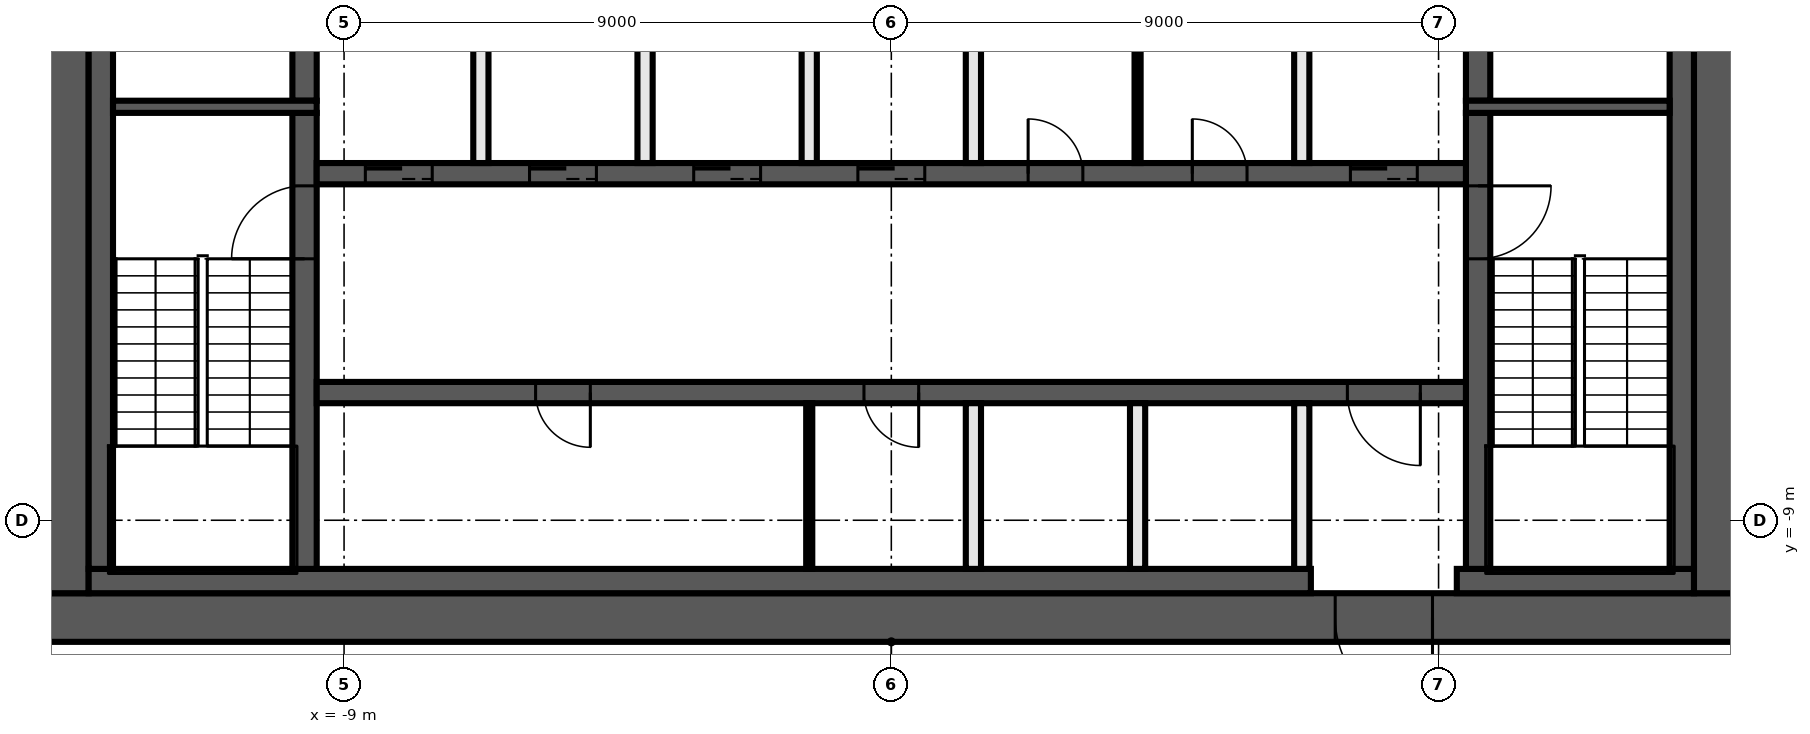
"""IFC4 building model, lengths in metres.
Left out: names, types, materials, properties, quantities, classifications, styles, units other than length and angle.
Written with IfcOpenShell. Run it as: python <this file> out.ifc"""

import sys

from ifc_helpers import new_model, si_unit, direction, frame, frame_2d, origin, place, context, subcontext, project, spatial, rectangle, extrude, element, fill, save


model = new_model("IFC4")
c1 = context("Model", 3, precision=1e-05, world=origin(), true_north=direction((0.0, 1.0)))
c2 = subcontext(c1, "Body", "Model", "MODEL_VIEW")
j1 = project(units=[si_unit("LENGTHUNIT", "METRE"), si_unit("PLANEANGLEUNIT", "RADIAN")], contexts=[c1])
p1 = place(None, origin())
s1 = spatial("IfcSite", under=j1, at=p1, CompositionType="ELEMENT")
p2 = place(p1, origin())
s2 = spatial("IfcBuilding", under=s1, at=p2, CompositionType="ELEMENT")
p3 = place(p2, frame((0.0, 0.0, 175.4)))
s3 = spatial("IfcBuildingStorey", under=s2, at=p3, CompositionType="ELEMENT", Elevation=175.4)
p4 = place(p3, frame((14.0, -10.6, 0.0), z_axis=(0.0, 0.0, 1.0), x_axis=(-1.0, 0.0, 0.0)))
e1 = element("IfcWall", 1, at=p4, inside=s3, PredefinedType="SHEAR", context=c2, shape_type="SweptSolid", body=[
    extrude(rectangle(XDim=28.0, YDim=0.8, at=frame_2d((14.0, 0.0))), origin(), (0.0, 0.0, 1.0), 3.82),
])
p5 = place(p4, frame((5.1, 0.0, 0.0)))
e2 = element("IfcOpeningElement", 2, at=p5, cuts=e1, PredefinedType="OPENING", context=c2, shape_type="SweptSolid", body=[
    extrude(rectangle(XDim=1.6, YDim=2.1, at=frame_2d((0.8, 1.05))), frame((0.0, 0.41, 0.0), z_axis=(0.0, -1.0, 0.0), x_axis=(1.0, 0.0, 0.0)), (0.0, 0.0, 1.0), 0.82),
])
for number, where, z_axis, x_axis in (
    (3, (13.6, 10.2, 0.0), (0.0, 0.0, 1.0), (0.0, -1.0, 0.0)),
    (4, (-13.6, -10.2, 0.0), (0.0, 0.0, 1.0), (0.0, 1.0, 0.0)),
):
    element("IfcWall", number, at=place(p3, frame(where, z_axis=z_axis, x_axis=x_axis)), inside=s3, PredefinedType="SHEAR", context=c2, shape_type="SweptSolid", body=[
        extrude(rectangle(XDim=20.4, YDim=0.8, at=frame_2d((10.2, 0.0))), origin(), (0.0, 0.0, 1.0), 3.82),
    ])
p6 = place(p3, frame((13.2, -10.0, 0.0), z_axis=(0.0, 0.0, 1.0), x_axis=(-1.0, 0.0, 0.0)))
e5 = element("IfcWall", 5, at=p6, inside=s3, PredefinedType="SHEAR", context=c2, shape_type="SweptSolid", body=[
    extrude(rectangle(XDim=3.9, YDim=0.4, at=frame_2d((1.95, 0.0))), origin(), (0.0, 0.0, 1.0), 3.82),
])
p7 = place(p3, frame((6.9, -10.0, 0.0), z_axis=(0.0, 0.0, 1.0), x_axis=(-1.0, 0.0, 0.0)))
e6 = element("IfcWall", 6, at=p7, inside=s3, PredefinedType="SHEAR", context=c2, shape_type="SweptSolid", body=[
    extrude(rectangle(XDim=20.1, YDim=0.4, at=frame_2d((10.05, 0.0))), origin(), (0.0, 0.0, 1.0), 3.82),
])
for number, where, z_axis, x_axis in (
    (7, (13.0, 9.8, 0.0), (0.0, 0.0, 1.0), (0.0, -1.0, 0.0)),
    (8, (-13.0, -9.8, 0.0), (0.0, 0.0, 1.0), (0.0, 1.0, 0.0)),
):
    element("IfcWall", number, at=place(p3, frame(where, z_axis=z_axis, x_axis=x_axis)), inside=s3, PredefinedType="SHEAR", context=c2, shape_type="SweptSolid", body=[
        extrude(rectangle(XDim=19.6, YDim=0.4, at=frame_2d((9.8, 0.0))), origin(), (0.0, 0.0, 1.0), 3.82),
    ])
p8 = place(p3, frame((9.65, -2.3, 0.0), z_axis=(0.0, 0.0, 1.0), x_axis=(0.0, -1.0, 0.0)))
e9 = element("IfcWall", 9, at=p8, inside=s3, PredefinedType="SHEAR", context=c2, shape_type="SweptSolid", body=[
    extrude(rectangle(XDim=7.5, YDim=0.4, at=frame_2d((3.75, 0.0))), origin(), (0.0, 0.0, 1.0), 3.82),
])
p9 = place(p8, frame((1.2, 0.0, 0.0)))
e10 = element("IfcOpeningElement", 10, at=p9, cuts=e9, PredefinedType="OPENING", context=c2, shape_type="SweptSolid", body=[
    extrude(rectangle(XDim=1.2, YDim=2.1, at=frame_2d((0.6, 1.05))), frame((0.0, 0.21, 0.0), z_axis=(0.0, -1.0, 0.0), x_axis=(1.0, 0.0, 0.0)), (0.0, 0.0, 1.0), 0.42),
])
p10 = place(p3, frame((9.65, 2.1, 0.0), z_axis=(0.0, 0.0, 1.0), x_axis=(0.0, -1.0, 0.0)))
e11 = element("IfcWall", 11, at=p10, inside=s3, PredefinedType="SHEAR", context=c2, shape_type="SweptSolid", body=[
    extrude(rectangle(XDim=4.2, YDim=0.4, at=frame_2d((2.1, 0.0))), origin(), (0.0, 0.0, 1.0), 3.82),
])
p11 = place(p10, frame((0.15, 0.0, 0.0)))
e12 = element("IfcOpeningElement", 12, at=p11, cuts=e11, PredefinedType="OPENING", context=c2, shape_type="SweptSolid", body=[
    extrude(rectangle(XDim=0.9, YDim=2.1, at=frame_2d((0.45, 1.05))), frame((0.0, 0.21, 0.0), z_axis=(0.0, -1.0, 0.0), x_axis=(1.0, 0.0, 0.0)), (0.0, 0.0, 1.0), 0.42),
])
p12 = place(p3, frame((-9.65, -9.8, 0.0), z_axis=(0.0, 0.0, 1.0), x_axis=(0.0, 1.0, 0.0)))
e13 = element("IfcWall", 13, at=p12, inside=s3, PredefinedType="SHEAR", context=c2, shape_type="SweptSolid", body=[
    extrude(rectangle(XDim=7.5, YDim=0.4, at=frame_2d((3.75, 0.0))), origin(), (0.0, 0.0, 1.0), 3.82),
])
p13 = place(p12, frame((5.1, 0.0, 0.0)))
e14 = element("IfcOpeningElement", 14, at=p13, cuts=e13, PredefinedType="OPENING", context=c2, shape_type="SweptSolid", body=[
    extrude(rectangle(XDim=1.2, YDim=2.1, at=frame_2d((0.6, 1.05))), frame((0.0, 0.21, 0.0), z_axis=(0.0, -1.0, 0.0), x_axis=(1.0, 0.0, 0.0)), (0.0, 0.0, 1.0), 0.42),
])
p14 = place(p3, frame((-9.65, -2.1, 0.0), z_axis=(0.0, 0.0, 1.0), x_axis=(0.0, 1.0, 0.0)))
e15 = element("IfcWall", 15, at=p14, inside=s3, PredefinedType="SHEAR", context=c2, shape_type="SweptSolid", body=[
    extrude(rectangle(XDim=4.2, YDim=0.4, at=frame_2d((2.1, 0.0))), origin(), (0.0, 0.0, 1.0), 3.82),
])
for number, where, z_axis, x_axis in (
    (16, (9.45, -2.2, 0.0), (0.0, 0.0, 1.0), (1.0, 0.0, 0.0)),
    (17, (-9.45, -2.2, 0.0), (0.0, 0.0, 1.0), (-1.0, 0.0, 0.0)),
):
    element("IfcWall", number, at=place(p3, frame(where, z_axis=z_axis, x_axis=x_axis)), inside=s3, PredefinedType="SHEAR", context=c2, shape_type="SweptSolid", body=[
        extrude(rectangle(XDim=3.35, YDim=0.2, at=frame_2d((1.675, 0.0))), origin(), (0.0, 0.0, 1.0), 3.82),
    ])
p15 = place(p3, frame((-9.45, -3.3, 0.0), z_axis=(0.0, 0.0, 1.0), x_axis=(1.0, 0.0, 0.0)))
e18 = element("IfcWall", 18, at=p15, inside=s3, PredefinedType="SHEAR", context=c2, shape_type="SweptSolid", body=[
    extrude(rectangle(XDim=18.9, YDim=0.35, at=frame_2d((9.45, 0.0))), origin(), (0.0, 0.0, 1.0), 3.82),
])
p16 = place(p15, frame((0.8, 0.0, 0.0)))
e19 = element("IfcOpeningElement", 19, at=p16, cuts=e18, PredefinedType="OPENING", context=c2, shape_type="SweptSolid", body=[
    extrude(rectangle(XDim=1.1, YDim=2.1, at=frame_2d((0.55, 1.05))), frame((0.0, 0.185, 0.0), z_axis=(0.0, -1.0, 0.0), x_axis=(1.0, 0.0, 0.0)), (0.0, 0.0, 1.0), 0.37),
])
p17 = place(p15, frame((3.5, 0.0, 0.0)))
e20 = element("IfcOpeningElement", 20, at=p17, cuts=e18, PredefinedType="OPENING", context=c2, shape_type="SweptSolid", body=[
    extrude(rectangle(XDim=1.1, YDim=2.1, at=frame_2d((0.55, 1.05))), frame((0.0, 0.185, 0.0), z_axis=(0.0, -1.0, 0.0), x_axis=(1.0, 0.0, 0.0)), (0.0, 0.0, 1.0), 0.37),
])
p18 = place(p15, frame((6.2, 0.0, 0.0)))
e21 = element("IfcOpeningElement", 21, at=p18, cuts=e18, PredefinedType="OPENING", context=c2, shape_type="SweptSolid", body=[
    extrude(rectangle(XDim=1.1, YDim=2.1, at=frame_2d((0.55, 1.05))), frame((0.0, 0.185, 0.0), z_axis=(0.0, -1.0, 0.0), x_axis=(1.0, 0.0, 0.0)), (0.0, 0.0, 1.0), 0.37),
])
p19 = place(p15, frame((8.9, 0.0, 0.0)))
e22 = element("IfcOpeningElement", 22, at=p19, cuts=e18, PredefinedType="OPENING", context=c2, shape_type="SweptSolid", body=[
    extrude(rectangle(XDim=1.1, YDim=2.1, at=frame_2d((0.55, 1.05))), frame((0.0, 0.185, 0.0), z_axis=(0.0, -1.0, 0.0), x_axis=(1.0, 0.0, 0.0)), (0.0, 0.0, 1.0), 0.37),
])
p20 = place(p15, frame((17.0, 0.0, 0.0)))
e23 = element("IfcOpeningElement", 23, at=p20, cuts=e18, PredefinedType="OPENING", context=c2, shape_type="SweptSolid", body=[
    extrude(rectangle(XDim=1.1, YDim=2.1, at=frame_2d((0.55, 1.05))), frame((0.0, 0.185, 0.0), z_axis=(0.0, -1.0, 0.0), x_axis=(1.0, 0.0, 0.0)), (0.0, 0.0, 1.0), 0.37),
])
p21 = place(p15, frame((11.7, 0.0, 0.0)))
e24 = element("IfcOpeningElement", 24, at=p21, cuts=e18, PredefinedType="OPENING", context=c2, shape_type="SweptSolid", body=[
    extrude(rectangle(XDim=0.9, YDim=2.1, at=frame_2d((0.45, 1.05))), frame((0.0, 0.185, 0.0), z_axis=(0.0, -1.0, 0.0), x_axis=(1.0, 0.0, 0.0)), (0.0, 0.0, 1.0), 0.37),
])
p22 = place(p15, frame((14.4, 0.0, 0.0)))
e25 = element("IfcOpeningElement", 25, at=p22, cuts=e18, PredefinedType="OPENING", context=c2, shape_type="SweptSolid", body=[
    extrude(rectangle(XDim=0.9, YDim=2.1, at=frame_2d((0.45, 1.05))), frame((0.0, 0.185, 0.0), z_axis=(0.0, -1.0, 0.0), x_axis=(1.0, 0.0, 0.0)), (0.0, 0.0, 1.0), 0.37),
])
p23 = place(p3, frame((9.45, -6.9, 0.0), z_axis=(0.0, 0.0, 1.0), x_axis=(-1.0, 0.0, 0.0)))
e26 = element("IfcWall", 26, at=p23, inside=s3, PredefinedType="SHEAR", context=c2, shape_type="SweptSolid", body=[
    extrude(rectangle(XDim=18.9, YDim=0.35, at=frame_2d((9.45, 0.0))), origin(), (0.0, 0.0, 1.0), 3.82),
])
p24 = place(p23, frame((0.75, 0.0, 0.0)))
e27 = element("IfcOpeningElement", 27, at=p24, cuts=e26, PredefinedType="OPENING", context=c2, shape_type="SweptSolid", body=[
    extrude(rectangle(XDim=1.2, YDim=2.1, at=frame_2d((0.6, 1.05))), frame((0.0, 0.185, 0.0), z_axis=(0.0, -1.0, 0.0), x_axis=(1.0, 0.0, 0.0)), (0.0, 0.0, 1.0), 0.37),
])
p25 = place(p23, frame((14.4, 0.0, 0.0)))
e28 = element("IfcOpeningElement", 28, at=p25, cuts=e26, PredefinedType="OPENING", context=c2, shape_type="SweptSolid", body=[
    extrude(rectangle(XDim=0.9, YDim=2.1, at=frame_2d((0.45, 1.05))), frame((0.0, 0.185, 0.0), z_axis=(0.0, -1.0, 0.0), x_axis=(1.0, 0.0, 0.0)), (0.0, 0.0, 1.0), 0.37),
])
p26 = place(p23, frame((9.0, 0.0, 0.0)))
e29 = element("IfcOpeningElement", 29, at=p26, cuts=e26, PredefinedType="OPENING", context=c2, shape_type="SweptSolid", body=[
    extrude(rectangle(XDim=0.9, YDim=2.1, at=frame_2d((0.45, 1.05))), frame((0.0, 0.185, 0.0), z_axis=(0.0, -1.0, 0.0), x_axis=(1.0, 0.0, 0.0)), (0.0, 0.0, 1.0), 0.37),
])
for number, where, z_axis, x_axis in (
    (30, (6.75, -9.8, 0.0), (0.0, 0.0, 1.0), (0.0, 1.0, 0.0)),
    (31, (6.75, -3.125, 0.0), (0.0, 0.0, 1.0), (0.0, 1.0, 0.0)),
):
    element("IfcWall", number, at=place(p3, frame(where, z_axis=z_axis, x_axis=x_axis)), inside=s3, PredefinedType="SOLIDWALL", context=c2, shape_type="SweptSolid", body=[
        extrude(rectangle(XDim=2.725, YDim=0.25, at=frame_2d((1.363, 0.0))), origin(), (0.0, 0.0, 1.0), 3.82),
    ])
p27 = place(p3, frame((4.05, -3.125, 0.0), z_axis=(0.0, 0.0, 1.0), x_axis=(0.0, 1.0, 0.0)))
e32 = element("IfcWall", 32, at=p27, inside=s3, PredefinedType="PARTITIONING", context=c2, shape_type="SweptSolid", body=[
    extrude(rectangle(XDim=2.725, YDim=0.1, at=frame_2d((1.363, 0.0))), origin(), (0.0, 0.0, 1.0), 3.82),
])
for number, where, z_axis, x_axis in (
    (33, (4.05, -9.8, 0.0), (0.0, 0.0, 1.0), (0.0, 1.0, 0.0)),
    (34, (1.35, -9.8, 0.0), (0.0, 0.0, 1.0), (0.0, 1.0, 0.0)),
    (35, (1.35, -3.125, 0.0), (0.0, 0.0, 1.0), (0.0, 1.0, 0.0)),
):
    element("IfcWall", number, at=place(p3, frame(where, z_axis=z_axis, x_axis=x_axis)), inside=s3, PredefinedType="SOLIDWALL", context=c2, shape_type="SweptSolid", body=[
        extrude(rectangle(XDim=2.725, YDim=0.25, at=frame_2d((1.363, 0.0))), origin(), (0.0, 0.0, 1.0), 3.82),
    ])
p28 = place(p3, frame((-1.35, -9.8, 0.0), z_axis=(0.0, 0.0, 1.0), x_axis=(0.0, 1.0, 0.0)))
e36 = element("IfcWall", 36, at=p28, inside=s3, PredefinedType="PARTITIONING", context=c2, shape_type="SweptSolid", body=[
    extrude(rectangle(XDim=2.725, YDim=0.1, at=frame_2d((1.363, 0.0))), origin(), (0.0, 0.0, 1.0), 3.82),
])
for number, where, z_axis, x_axis in (
    (37, (-1.35, -3.125, 0.0), (0.0, 0.0, 1.0), (0.0, 1.0, 0.0)),
    (38, (-4.05, -3.125, 0.0), (0.0, 0.0, 1.0), (0.0, 1.0, 0.0)),
    (39, (-6.75, -3.125, 0.0), (0.0, 0.0, 1.0), (0.0, 1.0, 0.0)),
):
    element("IfcWall", number, at=place(p3, frame(where, z_axis=z_axis, x_axis=x_axis)), inside=s3, PredefinedType="SOLIDWALL", context=c2, shape_type="SweptSolid", body=[
        extrude(rectangle(XDim=2.725, YDim=0.25, at=frame_2d((1.363, 0.0))), origin(), (0.0, 0.0, 1.0), 3.82),
    ])
p29 = place(p16, origin())
e40 = element("IfcDoor", 40, at=p29, inside=s3, OperationType="DOUBLE_DOOR_SLIDING", PredefinedType="DOOR", context=c2, shape_type="SweptSolid", body=[
    extrude(rectangle(XDim=1.1, YDim=2.1, at=frame_2d((0.55, 1.05))), frame((0.0, 0.025, 0.0), z_axis=(0.0, -1.0, 0.0), x_axis=(1.0, 0.0, 0.0)), (0.0, 0.0, 1.0), 0.05),
])
fill(e19, e40)
p30 = place(p17, origin())
e41 = element("IfcDoor", 41, at=p30, inside=s3, OperationType="DOUBLE_DOOR_SLIDING", PredefinedType="DOOR", context=c2, shape_type="SweptSolid", body=[
    extrude(rectangle(XDim=1.1, YDim=2.1, at=frame_2d((0.55, 1.05))), frame((0.0, 0.025, 0.0), z_axis=(0.0, -1.0, 0.0), x_axis=(1.0, 0.0, 0.0)), (0.0, 0.0, 1.0), 0.05),
])
fill(e20, e41)
p31 = place(p18, origin())
e42 = element("IfcDoor", 42, at=p31, inside=s3, OperationType="DOUBLE_DOOR_SLIDING", PredefinedType="DOOR", context=c2, shape_type="SweptSolid", body=[
    extrude(rectangle(XDim=1.1, YDim=2.1, at=frame_2d((0.55, 1.05))), frame((0.0, 0.025, 0.0), z_axis=(0.0, -1.0, 0.0), x_axis=(1.0, 0.0, 0.0)), (0.0, 0.0, 1.0), 0.05),
])
fill(e21, e42)
p32 = place(p19, origin())
e43 = element("IfcDoor", 43, at=p32, inside=s3, OperationType="DOUBLE_DOOR_SLIDING", PredefinedType="DOOR", context=c2, shape_type="SweptSolid", body=[
    extrude(rectangle(XDim=1.1, YDim=2.1, at=frame_2d((0.55, 1.05))), frame((0.0, 0.025, 0.0), z_axis=(0.0, -1.0, 0.0), x_axis=(1.0, 0.0, 0.0)), (0.0, 0.0, 1.0), 0.05),
])
fill(e22, e43)
p33 = place(p20, origin())
e44 = element("IfcDoor", 44, at=p33, inside=s3, OperationType="DOUBLE_DOOR_SLIDING", PredefinedType="DOOR", context=c2, shape_type="SweptSolid", body=[
    extrude(rectangle(XDim=1.1, YDim=2.1, at=frame_2d((0.55, 1.05))), frame((0.0, 0.025, 0.0), z_axis=(0.0, -1.0, 0.0), x_axis=(1.0, 0.0, 0.0)), (0.0, 0.0, 1.0), 0.05),
])
fill(e23, e44)
p34 = place(p5, origin())
e45 = element("IfcDoor", 45, at=p34, inside=s3, OperationType="DOUBLE_DOOR_SINGLE_SWING", PredefinedType="DOOR", context=c2, shape_type="SweptSolid", body=[
    extrude(rectangle(XDim=1.6, YDim=2.1, at=frame_2d((0.8, 1.05))), frame((0.0, 0.025, 0.0), z_axis=(0.0, -1.0, 0.0), x_axis=(1.0, 0.0, 0.0)), (0.0, 0.0, 1.0), 0.05),
])
fill(e2, e45)
p35 = place(p24, origin())
e46 = element("IfcDoor", 46, at=p35, inside=s3, OperationType="SINGLE_SWING_LEFT", PredefinedType="DOOR", context=c2, shape_type="SweptSolid", body=[
    extrude(rectangle(XDim=1.2, YDim=2.1, at=frame_2d((0.6, 1.05))), frame((0.0, 0.025, 0.0), z_axis=(0.0, -1.0, 0.0), x_axis=(1.0, 0.0, 0.0)), (0.0, 0.0, 1.0), 0.05),
])
fill(e27, e46)
p36 = place(p21, origin())
e47 = element("IfcDoor", 47, at=p36, inside=s3, OperationType="SINGLE_SWING_RIGHT", PredefinedType="DOOR", context=c2, shape_type="SweptSolid", body=[
    extrude(rectangle(XDim=0.9, YDim=2.1, at=frame_2d((0.45, 1.05))), frame((0.0, 0.025, 0.0), z_axis=(0.0, -1.0, 0.0), x_axis=(1.0, 0.0, 0.0)), (0.0, 0.0, 1.0), 0.05),
])
fill(e24, e47)
p37 = place(p22, origin())
e48 = element("IfcDoor", 48, at=p37, inside=s3, OperationType="SINGLE_SWING_LEFT", PredefinedType="DOOR", context=c2, shape_type="SweptSolid", body=[
    extrude(rectangle(XDim=0.9, YDim=2.1, at=frame_2d((0.45, 1.05))), frame((0.0, 0.025, 0.0), z_axis=(0.0, -1.0, 0.0), x_axis=(1.0, 0.0, 0.0)), (0.0, 0.0, 1.0), 0.05),
])
fill(e25, e48)
p38 = place(p25, origin())
e49 = element("IfcDoor", 49, at=p38, inside=s3, OperationType="SINGLE_SWING_RIGHT", PredefinedType="DOOR", context=c2, shape_type="SweptSolid", body=[
    extrude(rectangle(XDim=0.9, YDim=2.1, at=frame_2d((0.45, 1.05))), frame((0.0, 0.025, 0.0), z_axis=(0.0, -1.0, 0.0), x_axis=(1.0, 0.0, 0.0)), (0.0, 0.0, 1.0), 0.05),
])
fill(e28, e49)
p39 = place(p26, origin())
e50 = element("IfcDoor", 50, at=p39, inside=s3, OperationType="SINGLE_SWING_LEFT", PredefinedType="DOOR", context=c2, shape_type="SweptSolid", body=[
    extrude(rectangle(XDim=0.9, YDim=2.1, at=frame_2d((0.45, 1.05))), frame((0.0, 0.025, 0.0), z_axis=(0.0, -1.0, 0.0), x_axis=(1.0, 0.0, 0.0)), (0.0, 0.0, 1.0), 0.05),
])
fill(e29, e50)
p40 = place(p9, origin())
e51 = element("IfcDoor", 51, at=p40, inside=s3, OperationType="SINGLE_SWING_RIGHT", PredefinedType="DOOR", context=c2, shape_type="SweptSolid", body=[
    extrude(rectangle(XDim=1.2, YDim=2.1, at=frame_2d((0.6, 1.05))), frame((0.0, 0.025, 0.0), z_axis=(0.0, -1.0, 0.0), x_axis=(1.0, 0.0, 0.0)), (0.0, 0.0, 1.0), 0.05),
])
fill(e10, e51)
p41 = place(p13, origin())
e52 = element("IfcDoor", 52, at=p41, inside=s3, OperationType="SINGLE_SWING_LEFT", PredefinedType="DOOR", context=c2, shape_type="SweptSolid", body=[
    extrude(rectangle(XDim=1.2, YDim=2.1, at=frame_2d((0.6, 1.05))), frame((0.0, 0.025, 0.0), z_axis=(0.0, -1.0, 0.0), x_axis=(1.0, 0.0, 0.0)), (0.0, 0.0, 1.0), 0.05),
])
fill(e14, e52)
save(model, sys.argv[1])
